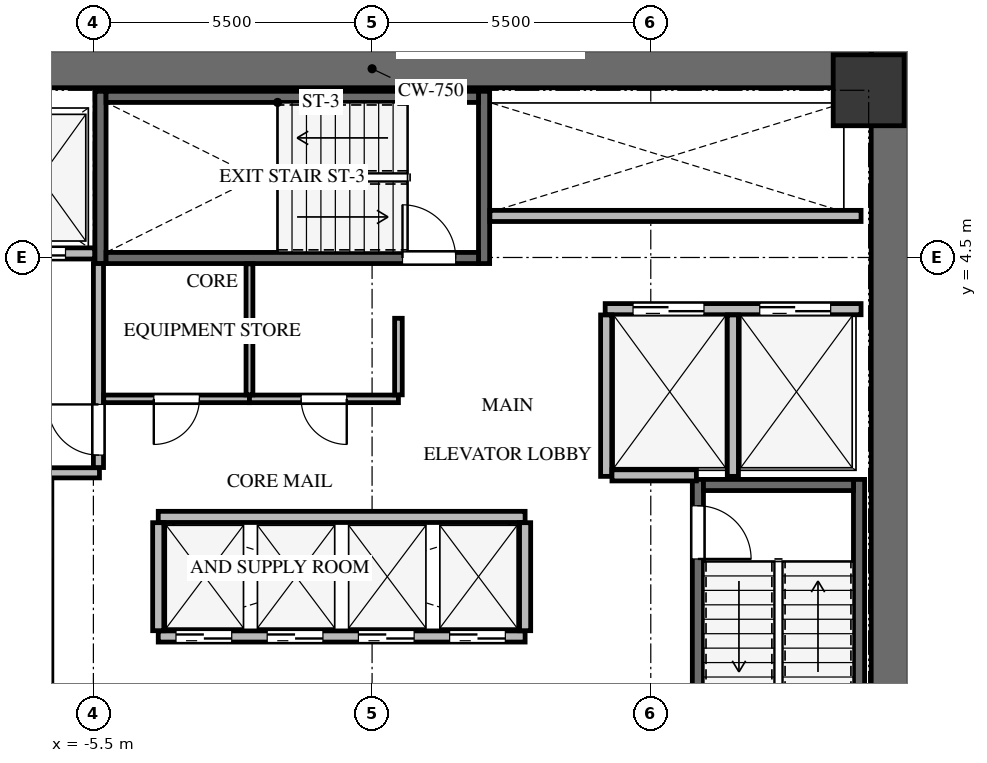
"""IFC4 building model, lengths in metres.
Left out: names, types, materials, properties, quantities, classifications, styles, units other than length and angle.
Written with IfcOpenShell. Run it as: python <this file> out.ifc"""

import sys

from ifc_helpers import new_model, si_unit, direction, frame, frame_2d, origin, origin_2d, place, context, subcontext, project, spatial, rectangle, extrude, source, transform, mapped, element, fill, save


model = new_model("IFC4")
c1 = context("Model", 3, precision=1e-05, world=origin(), true_north=direction((0.0, 1.0)))
c2 = subcontext(c1, "Body", "Model", "MODEL_VIEW")
j1 = project(units=[si_unit("LENGTHUNIT", "METRE"), si_unit("PLANEANGLEUNIT", "RADIAN")], contexts=[c1])
p1 = place(None, origin())
s1 = spatial("IfcSite", under=j1, at=p1, CompositionType="ELEMENT")
p2 = place(p1, origin())
s2 = spatial("IfcBuilding", under=s1, at=p2, CompositionType="ELEMENT")
p3 = place(p2, frame((0.0, 0.0, 117.3)))
s3 = spatial("IfcBuildingStorey", under=s2, at=p3, CompositionType="ELEMENT", Elevation=117.3)
p4 = place(p3, frame((10.225, -8.6, 0.0), z_axis=(0.0, 0.0, 1.0), x_axis=(0.0, 1.0, 0.0)))
e1 = element("IfcWall", 1, at=p4, inside=s3, PredefinedType="SHEAR", context=c2, shape_type="SweptSolid", body=[
    extrude(rectangle(XDim=17.2, YDim=0.75, at=frame_2d((8.6, 0.0))), origin(), (0.0, 0.0, 1.0), 3.3),
])
p5 = place(p3, frame((-9.85, 8.225, 0.0), z_axis=(0.0, 0.0, 1.0), x_axis=(1.0, 0.0, 0.0)))
e2 = element("IfcWall", 2, at=p5, inside=s3, PredefinedType="SHEAR", context=c2, shape_type="SweptSolid", body=[
    extrude(rectangle(XDim=19.7, YDim=0.75, at=frame_2d((9.85, 0.0))), origin(), (0.0, 0.0, 1.0), 3.3),
])
p6 = place(p3, frame((-6.43, -7.77, -0.24), z_axis=(0.0, 0.0, 1.0), x_axis=(0.0, 1.0, 0.0)))
e3 = element("IfcWall", 3, at=p6, inside=s3, PredefinedType="SHEAR", context=c2, shape_type="SweptSolid", body=[
    extrude(rectangle(XDim=7.89, YDim=0.22, at=frame_2d((3.945, 0.0))), origin(), (0.0, 0.0, 1.0), 3.3),
])
p7 = place(p6, frame((6.32, 0.0, 0.0)))
e4 = element("IfcOpeningElement", 4, at=p7, cuts=e3, PredefinedType="OPENING", context=c2, shape_type="SweptSolid", body=[
    extrude(rectangle(XDim=1.05, YDim=2.15, at=frame_2d((0.525, 1.075))), frame((0.0, 0.12, 0.0), z_axis=(0.0, -1.0, 0.0), x_axis=(1.0, 0.0, 0.0)), (0.0, 0.0, 1.0), 0.24),
])
p8 = place(p3, frame((9.61, -7.77, -0.24), z_axis=(0.0, 0.0, 1.0), x_axis=(0.0, 1.0, 0.0)))
e5 = element("IfcWall", 5, at=p8, inside=s3, PredefinedType="SHEAR", context=c2, shape_type="SweptSolid", body=[
    extrude(rectangle(XDim=7.89, YDim=0.22, at=frame_2d((3.945, 0.0))), origin(), (0.0, 0.0, 1.0), 3.3),
])
p9 = place(p3, frame((6.43, 0.12, -0.24), z_axis=(0.0, 0.0, 1.0), x_axis=(0.0, -1.0, 0.0)))
e6 = element("IfcWall", 6, at=p9, inside=s3, PredefinedType="SHEAR", context=c2, shape_type="SweptSolid", body=[
    extrude(rectangle(XDim=7.89, YDim=0.22, at=frame_2d((3.945, 0.0))), origin(), (0.0, 0.0, 1.0), 3.3),
])
p10 = place(p9, frame((0.52, 0.0, 0.0)))
e7 = element("IfcOpeningElement", 7, at=p10, cuts=e6, PredefinedType="OPENING", context=c2, shape_type="SweptSolid", body=[
    extrude(rectangle(XDim=1.05, YDim=2.15, at=frame_2d((0.525, 1.075))), frame((0.0, 0.12, 0.0), z_axis=(0.0, -1.0, 0.0), x_axis=(1.0, 0.0, 0.0)), (0.0, 0.0, 1.0), 0.24),
])
p11 = place(p3, frame((9.5, 0.01, -0.24), z_axis=(0.0, 0.0, 1.0), x_axis=(-1.0, 0.0, 0.0)))
e8 = element("IfcWall", 8, at=p11, inside=s3, PredefinedType="SHEAR", context=c2, shape_type="SweptSolid", body=[
    extrude(rectangle(XDim=2.96, YDim=0.22, at=frame_2d((1.48, 0.0))), origin(), (0.0, 0.0, 1.0), 3.3),
])
for number, where, z_axis, x_axis in (
    (9, (2.21, 4.38, -0.24), (0.0, 0.0, 1.0), (0.0, 1.0, 0.0)),
    (10, (-5.36, 7.78, -0.24), (0.0, 0.0, 1.0), (0.0, -1.0, 0.0)),
):
    element("IfcWall", number, at=place(p3, frame(where, z_axis=z_axis, x_axis=x_axis)), inside=s3, PredefinedType="SHEAR", context=c2, shape_type="SweptSolid", body=[
        extrude(rectangle(XDim=3.4, YDim=0.22, at=frame_2d((1.7, 0.0))), origin(), (0.0, 0.0, 1.0), 3.3),
    ])
p12 = place(p3, frame((-5.25, 4.49, -0.24), z_axis=(0.0, 0.0, 1.0), x_axis=(1.0, 0.0, 0.0)))
e11 = element("IfcWall", 11, at=p12, inside=s3, PredefinedType="SHEAR", context=c2, shape_type="SweptSolid", body=[
    extrude(rectangle(XDim=7.35, YDim=0.22, at=frame_2d((3.675, 0.0))), origin(), (0.0, 0.0, 1.0), 3.3),
])
p13 = place(p12, frame((5.85, 0.0, 0.0)))
e12 = element("IfcOpeningElement", 12, at=p13, cuts=e11, PredefinedType="OPENING", context=c2, shape_type="SweptSolid", body=[
    extrude(rectangle(XDim=1.05, YDim=2.15, at=frame_2d((0.525, 1.075))), frame((0.0, 0.12, 0.0), z_axis=(0.0, -1.0, 0.0), x_axis=(1.0, 0.0, 0.0)), (0.0, 0.0, 1.0), 0.24),
])
p14 = place(p3, frame((2.1, 7.67, -0.24), z_axis=(0.0, 0.0, 1.0), x_axis=(-1.0, 0.0, 0.0)))
e13 = element("IfcWall", 13, at=p14, inside=s3, PredefinedType="SHEAR", context=c2, shape_type="SweptSolid", body=[
    extrude(rectangle(XDim=7.35, YDim=0.22, at=frame_2d((3.675, 0.0))), origin(), (0.0, 0.0, 1.0), 3.3),
])
m1 = source(origin(), c2, "Body", "SweptSolid", [
    extrude(rectangle(XDim=1.4, YDim=1.4, at=origin_2d()), origin(), (0.0, 0.0, 1.0), 3.3),
])
p15 = place(p3, frame((9.8, 7.8, -0.24), z_axis=(0.0, 0.0, 1.0), x_axis=(1.0, 0.0, 0.0)))
e14 = element("IfcColumn", 14, at=p15, inside=s3, PredefinedType="COLUMN", context=c2, shape_type="MappedRepresentation", body=[
    mapped(m1, transform((0.0, 0.0, 0.0), x_axis=(1.0, 0.0, 0.0), y_axis=(0.0, 1.0, 0.0), z_axis=(0.0, 0.0, 1.0), scale=1.0)),
])
p16 = place(p3, frame((-9.65, 4.58, 0.0), z_axis=(0.0, 0.0, 1.0), x_axis=(1.0, 0.0, 0.0)))
e15 = element("IfcWall", 15, at=p16, inside=s3, PredefinedType="SOLIDWALL", context=c2, shape_type="SweptSolid", body=[
    extrude(rectangle(XDim=4.175, YDim=0.22, at=frame_2d((2.087, 0.0))), origin(), (0.0, 0.0, 1.0), 3.045),
])
p17 = place(p16, frame((0.4, 0.0, 0.0)))
e16 = element("IfcOpeningElement", 16, at=p17, cuts=e15, PredefinedType="OPENING", context=c2, shape_type="SweptSolid", body=[
    extrude(rectangle(XDim=1.2, YDim=2.15, at=frame_2d((0.6, 1.075))), frame((0.0, 0.12, 0.0), z_axis=(0.0, -1.0, 0.0), x_axis=(1.0, 0.0, 0.0)), (0.0, 0.0, 1.0), 0.24),
])
p18 = place(p16, frame((2.4, 0.0, 0.0)))
e17 = element("IfcOpeningElement", 17, at=p18, cuts=e15, PredefinedType="OPENING", context=c2, shape_type="SweptSolid", body=[
    extrude(rectangle(XDim=1.2, YDim=2.15, at=frame_2d((0.6, 1.075))), frame((0.0, 0.12, 0.0), z_axis=(0.0, -1.0, 0.0), x_axis=(1.0, 0.0, 0.0)), (0.0, 0.0, 1.0), 0.24),
])
p19 = place(p3, frame((-9.65, 0.25, 0.0), z_axis=(0.0, 0.0, 1.0), x_axis=(1.0, 0.0, 0.0)))
e18 = element("IfcWall", 18, at=p19, inside=s3, PredefinedType="SOLIDWALL", context=c2, shape_type="SweptSolid", body=[
    extrude(rectangle(XDim=4.27, YDim=0.2, at=frame_2d((2.135, 0.0))), origin(), (0.0, 0.0, 1.0), 3.045),
])
p20 = place(p3, frame((-5.4, 0.354, 0.0), z_axis=(0.0, 0.0, 1.0), x_axis=(0.0, 1.0, 0.0)))
e19 = element("IfcWall", 19, at=p20, inside=s3, PredefinedType="SOLIDWALL", context=c2, shape_type="SweptSolid", body=[
    extrude(rectangle(XDim=4.026, YDim=0.2, at=frame_2d((2.013, 0.0))), origin(), (0.0, 0.0, 1.0), 3.045),
])
p21 = place(p20, frame((0.246, 0.0, 0.0)))
e20 = element("IfcOpeningElement", 20, at=p21, cuts=e19, PredefinedType="OPENING", context=c2, shape_type="SweptSolid", body=[
    extrude(rectangle(XDim=1.0, YDim=2.15, at=frame_2d((0.5, 1.075))), frame((0.0, 0.11, 0.0), z_axis=(0.0, -1.0, 0.0), x_axis=(1.0, 0.0, 0.0)), (0.0, 0.0, 1.0), 0.22),
])
p22 = place(p3, frame((4.6, 3.48, 0.0), z_axis=(0.0, 0.0, 1.0), x_axis=(1.0, 0.0, 0.0)))
e21 = element("IfcWall", 21, at=p22, inside=s3, PredefinedType="SOLIDWALL", context=c2, shape_type="SweptSolid", body=[
    extrude(rectangle(XDim=5.05, YDim=0.22, at=frame_2d((2.525, 0.0))), origin(), (0.0, 0.0, 1.0), 3.045),
])
p23 = place(p22, frame((0.55, 0.0, 0.0)))
e22 = element("IfcOpeningElement", 22, at=p23, cuts=e21, PredefinedType="OPENING", context=c2, shape_type="SweptSolid", body=[
    extrude(rectangle(XDim=1.4, YDim=2.15, at=frame_2d((0.7, 1.075))), frame((0.0, 0.12, 0.0), z_axis=(0.0, -1.0, 0.0), x_axis=(1.0, 0.0, 0.0)), (0.0, 0.0, 1.0), 0.24),
])
p24 = place(p22, frame((3.05, 0.0, 0.0)))
e23 = element("IfcOpeningElement", 23, at=p24, cuts=e21, PredefinedType="OPENING", context=c2, shape_type="SweptSolid", body=[
    extrude(rectangle(XDim=1.4, YDim=2.15, at=frame_2d((0.7, 1.075))), frame((0.0, 0.12, 0.0), z_axis=(0.0, -1.0, 0.0), x_axis=(1.0, 0.0, 0.0)), (0.0, 0.0, 1.0), 0.24),
])
for number, where, z_axis, x_axis in (
    (24, (4.62, 0.18, 0.0), (0.0, 0.0, 1.0), (0.0, 1.0, 0.0)),
    (25, (7.12, 0.18, 0.0), (0.0, 0.0, 1.0), (0.0, 1.0, 0.0)),
):
    element("IfcWall", number, at=place(p3, frame(where, z_axis=z_axis, x_axis=x_axis)), inside=s3, PredefinedType="SOLIDWALL", context=c2, shape_type="SweptSolid", body=[
        extrude(rectangle(XDim=3.186, YDim=0.22, at=frame_2d((1.593, 0.0))), origin(), (0.0, 0.0, 1.0), 3.045),
    ])
p25 = place(p3, frame((4.734, 0.2, 0.0), z_axis=(0.0, 0.0, 1.0), x_axis=(1.0, 0.0, 0.0)))
e26 = element("IfcWall", 26, at=p25, inside=s3, PredefinedType="SOLIDWALL", context=c2, shape_type="SweptSolid", body=[
    extrude(rectangle(XDim=1.666, YDim=0.22, at=frame_2d((0.833, 0.0))), origin(), (0.0, 0.0, 1.0), 3.045),
])
p26 = place(p3, frame((-4.22, -2.98, 0.0), z_axis=(0.0, 0.0, 1.0), x_axis=(1.0, 0.0, 0.0)))
e27 = element("IfcWall", 27, at=p26, inside=s3, PredefinedType="SOLIDWALL", context=c2, shape_type="SweptSolid", body=[
    extrude(rectangle(XDim=7.24, YDim=0.22, at=frame_2d((3.62, 0.0))), origin(), (0.0, 0.0, 1.0), 3.045),
])
p27 = place(p26, frame((0.35, 0.0, 0.0)))
e28 = element("IfcOpeningElement", 28, at=p27, cuts=e27, PredefinedType="OPENING", context=c2, shape_type="SweptSolid", body=[
    extrude(rectangle(XDim=1.1, YDim=2.15, at=frame_2d((0.55, 1.075))), frame((0.0, 0.12, 0.0), z_axis=(0.0, -1.0, 0.0), x_axis=(1.0, 0.0, 0.0)), (0.0, 0.0, 1.0), 0.24),
])
p28 = place(p26, frame((2.15, 0.0, 0.0)))
e29 = element("IfcOpeningElement", 29, at=p28, cuts=e27, PredefinedType="OPENING", context=c2, shape_type="SweptSolid", body=[
    extrude(rectangle(XDim=1.1, YDim=2.15, at=frame_2d((0.55, 1.075))), frame((0.0, 0.12, 0.0), z_axis=(0.0, -1.0, 0.0), x_axis=(1.0, 0.0, 0.0)), (0.0, 0.0, 1.0), 0.24),
])
p29 = place(p26, frame((3.95, 0.0, 0.0)))
e30 = element("IfcOpeningElement", 30, at=p29, cuts=e27, PredefinedType="OPENING", context=c2, shape_type="SweptSolid", body=[
    extrude(rectangle(XDim=1.1, YDim=2.15, at=frame_2d((0.55, 1.075))), frame((0.0, 0.12, 0.0), z_axis=(0.0, -1.0, 0.0), x_axis=(1.0, 0.0, 0.0)), (0.0, 0.0, 1.0), 0.24),
])
p30 = place(p26, frame((5.75, 0.0, 0.0)))
e31 = element("IfcOpeningElement", 31, at=p30, cuts=e27, PredefinedType="OPENING", context=c2, shape_type="SweptSolid", body=[
    extrude(rectangle(XDim=1.1, YDim=2.15, at=frame_2d((0.55, 1.075))), frame((0.0, 0.12, 0.0), z_axis=(0.0, -1.0, 0.0), x_axis=(1.0, 0.0, 0.0)), (0.0, 0.0, 1.0), 0.24),
])
p31 = place(p3, frame((-4.22, -0.62, 0.0), z_axis=(0.0, 0.0, 1.0), x_axis=(1.0, 0.0, 0.0)))
e32 = element("IfcWall", 32, at=p31, inside=s3, PredefinedType="SOLIDWALL", context=c2, shape_type="SweptSolid", body=[
    extrude(rectangle(XDim=7.24, YDim=0.22, at=frame_2d((3.62, 0.0))), origin(), (0.0, 0.0, 1.0), 3.045),
])
for number, where, z_axis, x_axis in (
    (33, (-4.22, -2.866, 0.0), (0.0, 0.0, 1.0), (0.0, 1.0, 0.0)),
    (34, (3.02, -2.866, 0.0), (0.0, 0.0, 1.0), (0.0, 1.0, 0.0)),
):
    element("IfcWall", number, at=place(p3, frame(where, z_axis=z_axis, x_axis=x_axis)), inside=s3, PredefinedType="SOLIDWALL", context=c2, shape_type="SweptSolid", body=[
        extrude(rectangle(XDim=2.132, YDim=0.22, at=frame_2d((1.066, 0.0))), origin(), (0.0, 0.0, 1.0), 3.045),
    ])
p32 = place(p3, frame((2.325, 5.32, 0.0), z_axis=(0.0, 0.0, 1.0), x_axis=(1.0, 0.0, 0.0)))
e35 = element("IfcWall", 35, at=p32, inside=s3, PredefinedType="SOLIDWALL", context=c2, shape_type="SweptSolid", body=[
    extrude(rectangle(XDim=7.325, YDim=0.22, at=frame_2d((3.663, 0.0))), origin(), (0.0, 0.0, 1.0), 3.045),
])
p33 = place(p3, frame((-2.42, 1.71, 0.0), z_axis=(0.0, 0.0, 1.0), x_axis=(-1.0, 0.0, 0.0)))
e36 = element("IfcWall", 36, at=p33, inside=s3, PredefinedType="PARTITIONING", context=c2, shape_type="SweptSolid", body=[
    extrude(rectangle(XDim=2.876, YDim=0.15, at=frame_2d((1.438, 0.0))), origin(), (0.0, 0.0, 1.0), 3.045),
])
p34 = place(p33, frame((0.988, 0.0, 0.0)))
e37 = element("IfcOpeningElement", 37, at=p34, cuts=e36, PredefinedType="OPENING", context=c2, shape_type="SweptSolid", body=[
    extrude(rectangle(XDim=0.9, YDim=2.05, at=frame_2d((0.45, 1.025))), frame((0.0, 0.085, 0.0), z_axis=(0.0, -1.0, 0.0), x_axis=(1.0, 0.0, 0.0)), (0.0, 0.0, 1.0), 0.17),
])
p35 = place(p3, frame((0.52, 1.71, 0.0), z_axis=(0.0, 0.0, 1.0), x_axis=(-1.0, 0.0, 0.0)))
e38 = element("IfcWall", 38, at=p35, inside=s3, PredefinedType="PARTITIONING", context=c2, shape_type="SweptSolid", body=[
    extrude(rectangle(XDim=2.94, YDim=0.15, at=frame_2d((1.47, 0.0))), origin(), (0.0, 0.0, 1.0), 3.045),
])
p36 = place(p35, frame((1.02, 0.0, 0.0)))
e39 = element("IfcOpeningElement", 39, at=p36, cuts=e38, PredefinedType="OPENING", context=c2, shape_type="SweptSolid", body=[
    extrude(rectangle(XDim=0.9, YDim=2.05, at=frame_2d((0.45, 1.025))), frame((0.0, 0.085, 0.0), z_axis=(0.0, -1.0, 0.0), x_axis=(1.0, 0.0, 0.0)), (0.0, 0.0, 1.0), 0.17),
])
p37 = place(p3, frame((0.52, 3.3, 0.0), z_axis=(0.0, 0.0, 1.0), x_axis=(0.0, -1.0, 0.0)))
e40 = element("IfcWall", 40, at=p37, inside=s3, PredefinedType="PARTITIONING", context=c2, shape_type="SweptSolid", body=[
    extrude(rectangle(XDim=1.511, YDim=0.15, at=frame_2d((0.755, 0.0))), origin(), (0.0, 0.0, 1.0), 3.045),
])
p38 = place(p3, frame((-2.42, 4.375, 0.0), z_axis=(0.0, 0.0, 1.0), x_axis=(0.0, -1.0, 0.0)))
e41 = element("IfcWall", 41, at=p38, inside=s3, PredefinedType="PARTITIONING", context=c2, shape_type="SweptSolid", body=[
    extrude(rectangle(XDim=2.586, YDim=0.135, at=frame_2d((1.293, 0.0))), origin(), (0.0, 0.0, 1.0), 3.045),
])
m2 = source(origin(), c2, "Body", "SweptSolid", [
    extrude(rectangle(XDim=1.05, YDim=2.15, at=frame_2d((0.525, 1.075))), frame((0.0, 0.025, 0.0), z_axis=(0.0, -1.0, 0.0), x_axis=(1.0, 0.0, 0.0)), (0.0, 0.0, 1.0), 0.05),
])
p39 = place(p10, origin())
e42 = element("IfcDoor", 42, at=p39, inside=s3, OperationType="SINGLE_SWING_RIGHT", PredefinedType="DOOR", context=c2, shape_type="MappedRepresentation", body=[
    mapped(m2, transform((0.0, 0.0, 0.0), x_axis=(1.0, 0.0, 0.0), y_axis=(0.0, 1.0, 0.0), z_axis=(0.0, 0.0, 1.0), scale=1.0)),
])
fill(e7, e42)
m3 = source(origin(), c2, "Body", "SweptSolid", [
    extrude(rectangle(XDim=1.05, YDim=2.15, at=frame_2d((0.525, 1.075))), frame((0.0, 0.025, 0.0), z_axis=(0.0, -1.0, 0.0), x_axis=(1.0, 0.0, 0.0)), (0.0, 0.0, 1.0), 0.05),
])
p40 = place(p13, origin())
e43 = element("IfcDoor", 43, at=p40, inside=s3, OperationType="SINGLE_SWING_LEFT", PredefinedType="DOOR", context=c2, shape_type="MappedRepresentation", body=[
    mapped(m3, transform((0.0, 0.0, 0.0), x_axis=(1.0, 0.0, 0.0), y_axis=(0.0, 1.0, 0.0), z_axis=(0.0, 0.0, 1.0), scale=1.0)),
])
fill(e12, e43)
m4 = source(origin(), c2, "Body", "SweptSolid", [
    extrude(rectangle(XDim=1.2, YDim=2.15, at=frame_2d((0.6, 1.075))), frame((0.0, 0.025, 0.0), z_axis=(0.0, -1.0, 0.0), x_axis=(1.0, 0.0, 0.0)), (0.0, 0.0, 1.0), 0.05),
])
p41 = place(p18, origin())
e44 = element("IfcDoor", 44, at=p41, inside=s3, OperationType="DOUBLE_DOOR_SLIDING", PredefinedType="DOOR", context=c2, shape_type="MappedRepresentation", body=[
    mapped(m4, transform((0.0, 0.0, 0.0), x_axis=(1.0, 0.0, 0.0), y_axis=(0.0, 1.0, 0.0), z_axis=(0.0, 0.0, 1.0), scale=1.0)),
])
fill(e17, e44)
m5 = source(origin(), c2, "Body", "SweptSolid", [
    extrude(rectangle(XDim=1.0, YDim=2.15, at=frame_2d((0.5, 1.075))), frame((0.0, 0.025, 0.0), z_axis=(0.0, -1.0, 0.0), x_axis=(1.0, 0.0, 0.0)), (0.0, 0.0, 1.0), 0.05),
])
p42 = place(p21, origin())
e45 = element("IfcDoor", 45, at=p42, inside=s3, OperationType="SINGLE_SWING_RIGHT", PredefinedType="DOOR", context=c2, shape_type="MappedRepresentation", body=[
    mapped(m5, transform((0.0, 0.0, 0.0), x_axis=(1.0, 0.0, 0.0), y_axis=(0.0, 1.0, 0.0), z_axis=(0.0, 0.0, 1.0), scale=1.0)),
])
fill(e20, e45)
m6 = source(origin(), c2, "Body", "SweptSolid", [
    extrude(rectangle(XDim=1.4, YDim=2.15, at=frame_2d((0.7, 1.075))), frame((0.0, 0.025, 0.0), z_axis=(0.0, -1.0, 0.0), x_axis=(1.0, 0.0, 0.0)), (0.0, 0.0, 1.0), 0.05),
])
p43 = place(p23, origin())
e46 = element("IfcDoor", 46, at=p43, inside=s3, OperationType="DOUBLE_DOOR_SLIDING", PredefinedType="DOOR", context=c2, shape_type="MappedRepresentation", body=[
    mapped(m6, transform((0.0, 0.0, 0.0), x_axis=(1.0, 0.0, 0.0), y_axis=(0.0, 1.0, 0.0), z_axis=(0.0, 0.0, 1.0), scale=1.0)),
])
fill(e22, e46)
p44 = place(p24, origin())
e47 = element("IfcDoor", 47, at=p44, inside=s3, OperationType="DOUBLE_DOOR_SLIDING", PredefinedType="DOOR", context=c2, shape_type="MappedRepresentation", body=[
    mapped(m6, transform((0.0, 0.0, 0.0), x_axis=(1.0, 0.0, 0.0), y_axis=(0.0, 1.0, 0.0), z_axis=(0.0, 0.0, 1.0), scale=1.0)),
])
fill(e23, e47)
m7 = source(origin(), c2, "Body", "SweptSolid", [
    extrude(rectangle(XDim=1.1, YDim=2.15, at=frame_2d((0.55, 1.075))), frame((0.0, 0.025, 0.0), z_axis=(0.0, -1.0, 0.0), x_axis=(1.0, 0.0, 0.0)), (0.0, 0.0, 1.0), 0.05),
])
p45 = place(p27, origin())
e48 = element("IfcDoor", 48, at=p45, inside=s3, OperationType="DOUBLE_DOOR_SLIDING", PredefinedType="DOOR", context=c2, shape_type="MappedRepresentation", body=[
    mapped(m7, transform((0.0, 0.0, 0.0), x_axis=(1.0, 0.0, 0.0), y_axis=(0.0, 1.0, 0.0), z_axis=(0.0, 0.0, 1.0), scale=1.0)),
])
fill(e28, e48)
p46 = place(p28, origin())
e49 = element("IfcDoor", 49, at=p46, inside=s3, OperationType="DOUBLE_DOOR_SLIDING", PredefinedType="DOOR", context=c2, shape_type="MappedRepresentation", body=[
    mapped(m7, transform((0.0, 0.0, 0.0), x_axis=(1.0, 0.0, 0.0), y_axis=(0.0, 1.0, 0.0), z_axis=(0.0, 0.0, 1.0), scale=1.0)),
])
fill(e29, e49)
p47 = place(p29, origin())
e50 = element("IfcDoor", 50, at=p47, inside=s3, OperationType="DOUBLE_DOOR_SLIDING", PredefinedType="DOOR", context=c2, shape_type="MappedRepresentation", body=[
    mapped(m7, transform((0.0, 0.0, 0.0), x_axis=(1.0, 0.0, 0.0), y_axis=(0.0, 1.0, 0.0), z_axis=(0.0, 0.0, 1.0), scale=1.0)),
])
fill(e30, e50)
p48 = place(p30, origin())
e51 = element("IfcDoor", 51, at=p48, inside=s3, OperationType="DOUBLE_DOOR_SLIDING", PredefinedType="DOOR", context=c2, shape_type="MappedRepresentation", body=[
    mapped(m7, transform((0.0, 0.0, 0.0), x_axis=(1.0, 0.0, 0.0), y_axis=(0.0, 1.0, 0.0), z_axis=(0.0, 0.0, 1.0), scale=1.0)),
])
fill(e31, e51)
m8 = source(origin(), c2, "Body", "SweptSolid", [
    extrude(rectangle(XDim=0.9, YDim=2.05, at=frame_2d((0.45, 1.025))), frame((0.0, 0.025, 0.0), z_axis=(0.0, -1.0, 0.0), x_axis=(1.0, 0.0, 0.0)), (0.0, 0.0, 1.0), 0.05),
])
p49 = place(p34, origin())
e52 = element("IfcDoor", 52, at=p49, inside=s3, OperationType="SINGLE_SWING_RIGHT", PredefinedType="DOOR", context=c2, shape_type="MappedRepresentation", body=[
    mapped(m8, transform((0.0, 0.0, 0.0), x_axis=(1.0, 0.0, 0.0), y_axis=(0.0, 1.0, 0.0), z_axis=(0.0, 0.0, 1.0), scale=1.0)),
])
fill(e37, e52)
m9 = source(origin(), c2, "Body", "SweptSolid", [
    extrude(rectangle(XDim=0.9, YDim=2.05, at=frame_2d((0.45, 1.025))), frame((0.0, 0.025, 0.0), z_axis=(0.0, -1.0, 0.0), x_axis=(1.0, 0.0, 0.0)), (0.0, 0.0, 1.0), 0.05),
])
p50 = place(p36, origin())
e53 = element("IfcDoor", 53, at=p50, inside=s3, OperationType="SINGLE_SWING_LEFT", PredefinedType="DOOR", context=c2, shape_type="MappedRepresentation", body=[
    mapped(m9, transform((0.0, 0.0, 0.0), x_axis=(1.0, 0.0, 0.0), y_axis=(0.0, 1.0, 0.0), z_axis=(0.0, 0.0, 1.0), scale=1.0)),
])
fill(e39, e53)
save(model, sys.argv[1])
